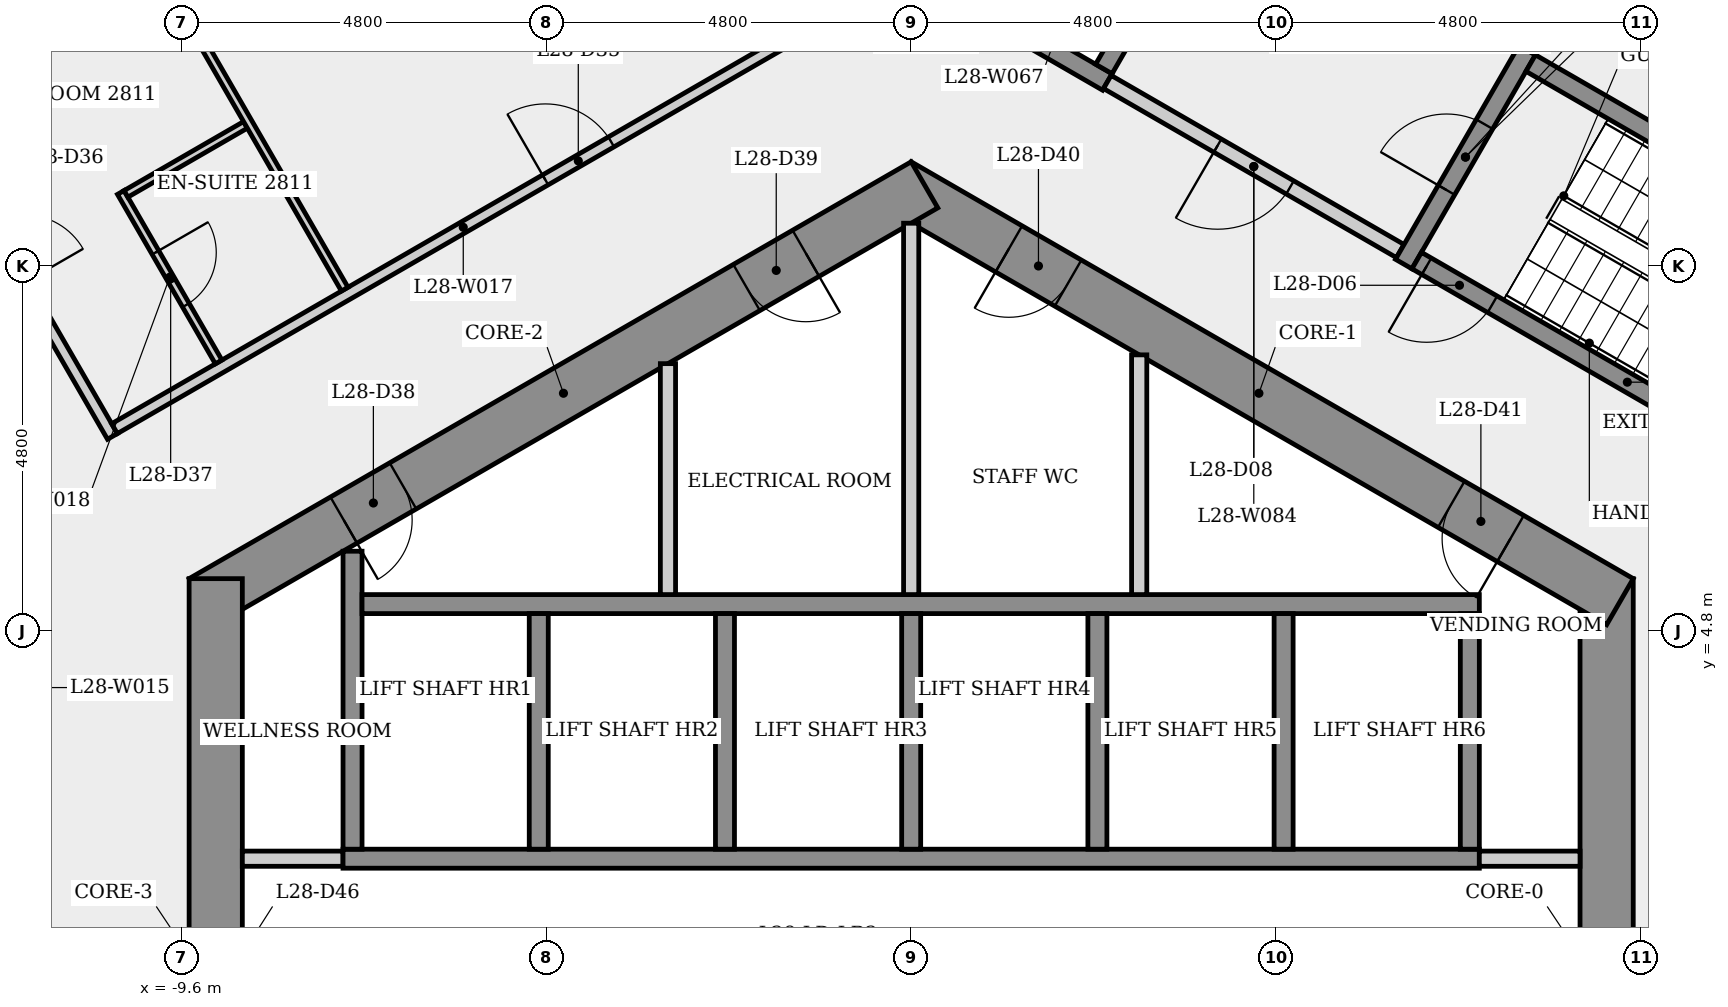
"""IFC4 building model, lengths in metres.
Left out: names, types, materials, properties, quantities, classifications, styles, units other than length and angle.
Written with IfcOpenShell. Run it as: python <this file> out.ifc"""

import sys

from ifc_helpers import new_model, si_unit, direction, frame, frame_2d, origin, place, context, subcontext, project, spatial, rectangle, extrude, element, fill, save


model = new_model("IFC4")
c1 = context("Model", 3, precision=1e-05, world=origin(), true_north=direction((0.0, 1.0)))
c2 = subcontext(c1, "Body", "Model", "MODEL_VIEW")
j1 = project(units=[si_unit("LENGTHUNIT", "METRE"), si_unit("PLANEANGLEUNIT", "RADIAN")], contexts=[c1])
p1 = place(None, origin())
s1 = spatial("IfcSite", under=j1, at=p1, CompositionType="ELEMENT")
p2 = place(p1, origin())
s2 = spatial("IfcBuilding", under=s1, at=p2, CompositionType="ELEMENT")
p3 = place(p2, frame((0.0, 0.0, 106.9)))
s3 = spatial("IfcBuildingStorey", under=s2, at=p3, CompositionType="ELEMENT", Elevation=106.9)
p4 = place(p3, frame((9.15, -5.485, 0.0), z_axis=(0.0, 0.0, 1.0), x_axis=(0.0, 1.0, 0.0)))
e1 = element("IfcWall", 1, at=p4, inside=s3, PredefinedType="SHEAR", context=c2, shape_type="SweptSolid", body=[
    extrude(rectangle(XDim=10.97, YDim=0.7, at=frame_2d((5.485, 0.0))), origin(), (0.0, 0.0, 1.0), 3.4),
])
p5 = place(p4, frame((4.685, 0.0, 0.0)))
e2 = element("IfcOpeningElement", 2, at=p5, cuts=e1, PredefinedType="OPENING", context=c2, shape_type="SweptSolid", body=[
    extrude(rectangle(XDim=1.6, YDim=2.1, at=frame_2d((0.8, 1.05))), frame((0.0, 0.36, 0.0), z_axis=(0.0, -1.0, 0.0), x_axis=(1.0, 0.0, 0.0)), (0.0, 0.0, 1.0), 0.72),
])
p6 = place(p3, frame((9.325, 5.182, 0.0), z_axis=(0.0, 0.0, 1.0), x_axis=(-0.866023993627, 0.500002442456, 0.0)))
e3 = element("IfcWall", 3, at=p6, inside=s3, PredefinedType="SHEAR", context=c2, shape_type="SweptSolid", body=[
    extrude(rectangle(XDim=10.97, YDim=0.7, at=frame_2d((5.485, 0.0))), origin(), (0.0, 0.0, 1.0), 3.4),
])
p7 = place(p6, frame((8.384, 0.0, 0.0)))
e4 = element("IfcOpeningElement", 4, at=p7, cuts=e3, PredefinedType="OPENING", context=c2, shape_type="SweptSolid", body=[
    extrude(rectangle(XDim=0.9, YDim=2.1, at=frame_2d((0.45, 1.05))), frame((0.0, 0.36, 0.0), z_axis=(0.0, -1.0, 0.0), x_axis=(1.0, 0.0, 0.0)), (0.0, 0.0, 1.0), 0.72),
])
p8 = place(p6, frame((1.663, 0.0, 0.0)))
e5 = element("IfcOpeningElement", 5, at=p8, cuts=e3, PredefinedType="OPENING", context=c2, shape_type="SweptSolid", body=[
    extrude(rectangle(XDim=0.9, YDim=2.1, at=frame_2d((0.45, 1.05))), frame((0.0, 0.36, 0.0), z_axis=(0.0, -1.0, 0.0), x_axis=(1.0, 0.0, 0.0)), (0.0, 0.0, 1.0), 0.72),
])
p9 = place(p3, frame((0.175, 10.667, 0.0), z_axis=(0.0, 0.0, 1.0), x_axis=(-0.866023993627, -0.500002442456, 0.0)))
e6 = element("IfcWall", 6, at=p9, inside=s3, PredefinedType="SHEAR", context=c2, shape_type="SweptSolid", body=[
    extrude(rectangle(XDim=10.97, YDim=0.7, at=frame_2d((5.485, 0.0))), origin(), (0.0, 0.0, 1.0), 3.4),
])
p10 = place(p9, frame((7.923, 0.0, 0.0)))
e7 = element("IfcOpeningElement", 7, at=p10, cuts=e6, PredefinedType="OPENING", context=c2, shape_type="SweptSolid", body=[
    extrude(rectangle(XDim=0.9, YDim=2.1, at=frame_2d((0.45, 1.05))), frame((0.0, 0.36, 0.0), z_axis=(0.0, -1.0, 0.0), x_axis=(1.0, 0.0, 0.0)), (0.0, 0.0, 1.0), 0.72),
])
p11 = place(p9, frame((1.802, 0.0, 0.0)))
e8 = element("IfcOpeningElement", 8, at=p11, cuts=e6, PredefinedType="OPENING", context=c2, shape_type="SweptSolid", body=[
    extrude(rectangle(XDim=0.9, YDim=2.1, at=frame_2d((0.45, 1.05))), frame((0.0, 0.36, 0.0), z_axis=(0.0, -1.0, 0.0), x_axis=(1.0, 0.0, 0.0)), (0.0, 0.0, 1.0), 0.72),
])
p12 = place(p3, frame((-9.15, 5.485, 0.0), z_axis=(0.0, 0.0, 1.0), x_axis=(0.0, -1.0, 0.0)))
e9 = element("IfcWall", 9, at=p12, inside=s3, PredefinedType="SHEAR", context=c2, shape_type="SweptSolid", body=[
    extrude(rectangle(XDim=10.97, YDim=0.7, at=frame_2d((5.485, 0.0))), origin(), (0.0, 0.0, 1.0), 3.4),
])
p13 = place(p12, frame((4.685, 0.0, 0.0)))
e10 = element("IfcOpeningElement", 10, at=p13, cuts=e9, PredefinedType="OPENING", context=c2, shape_type="SweptSolid", body=[
    extrude(rectangle(XDim=1.6, YDim=2.1, at=frame_2d((0.8, 1.05))), frame((0.0, 0.36, 0.0), z_axis=(0.0, -1.0, 0.0), x_axis=(1.0, 0.0, 0.0)), (0.0, 0.0, 1.0), 0.72),
])
p14 = place(p3, frame((-13.252, 12.108, 0.0), z_axis=(0.0, 0.0, 1.0), x_axis=(0.500015161905, -0.866016649877, 0.0)))
e11 = element("IfcWall", 11, at=p14, inside=s3, PredefinedType="PARTITIONING", context=c2, shape_type="SweptSolid", body=[
    extrude(rectangle(XDim=5.487, YDim=0.15, at=frame_2d((2.744, 0.0))), origin(), (0.0, 0.0, 1.0), 3.05),
])
p15 = place(p14, frame((2.256, 0.0, 0.0)))
e12 = element("IfcOpeningElement", 12, at=p15, cuts=e11, PredefinedType="OPENING", context=c2, shape_type="SweptSolid", body=[
    extrude(rectangle(XDim=0.9, YDim=2.1, at=frame_2d((0.45, 1.05))), frame((0.0, 0.085, 0.0), z_axis=(0.0, -1.0, 0.0), x_axis=(1.0, 0.0, 0.0)), (0.0, 0.0, 1.0), 0.17),
])
p16 = place(p3, frame((-10.481, 7.458, 0.0), z_axis=(0.0, 0.0, 1.0), x_axis=(0.866018292242, 0.500012317351, 0.0)))
e13 = element("IfcWall", 13, at=p16, inside=s3, PredefinedType="PARTITIONING", context=c2, shape_type="SweptSolid", body=[
    extrude(rectangle(XDim=10.596, YDim=0.15, at=frame_2d((5.298, 0.0))), origin(), (0.0, 0.0, 1.0), 3.05),
])
p17 = place(p16, frame((6.546, 0.0, 0.0)))
e14 = element("IfcOpeningElement", 14, at=p17, cuts=e13, PredefinedType="OPENING", context=c2, shape_type="SweptSolid", body=[
    extrude(rectangle(XDim=1.0, YDim=2.1, at=frame_2d((0.5, 1.05))), frame((0.0, 0.085, 0.0), z_axis=(0.0, -1.0, 0.0), x_axis=(1.0, 0.0, 0.0)), (0.0, 0.0, 1.0), 0.17),
])
p18 = place(p3, frame((-10.399, 10.566, 0.0), z_axis=(0.0, 0.0, 1.0), x_axis=(0.499963209246, -0.866046643894, 0.0)))
e15 = element("IfcWall", 15, at=p18, inside=s3, PredefinedType="PARTITIONING", context=c2, shape_type="SweptSolid", body=[
    extrude(rectangle(XDim=2.575, YDim=0.1, at=frame_2d((1.288, 0.0))), origin(), (0.0, 0.0, 1.0), 3.05),
])
p19 = place(p18, frame((0.913, 0.0, 0.0)))
e16 = element("IfcOpeningElement", 16, at=p19, cuts=e15, PredefinedType="OPENING", context=c2, shape_type="SweptSolid", body=[
    extrude(rectangle(XDim=0.8, YDim=2.1, at=frame_2d((0.4, 1.05))), frame((0.0, 0.06, 0.0), z_axis=(0.0, -1.0, 0.0), x_axis=(1.0, 0.0, 0.0)), (0.0, 0.0, 1.0), 0.12),
])
p20 = place(p3, frame((-8.8, 1.8, 0.0), z_axis=(0.0, 0.0, 1.0), x_axis=(1.0, 0.0, 0.0)))
e17 = element("IfcWall", 17, at=p20, inside=s3, PredefinedType="PARTITIONING", context=c2, shape_type="SweptSolid", body=[
    extrude(rectangle(XDim=1.325, YDim=0.2, at=frame_2d((0.663, 0.0))), origin(), (0.0, 0.0, 1.0), 3.05),
])
p21 = place(p3, frame((-8.759, 11.455, 0.0), z_axis=(0.0, 0.0, 1.0), x_axis=(-0.865999684151, -0.500044545065, 0.0)))
e18 = element("IfcWall", 18, at=p21, inside=s3, PredefinedType="PARTITIONING", context=c2, shape_type="SweptSolid", body=[
    extrude(rectangle(XDim=1.815, YDim=0.1, at=frame_2d((0.908, 0.0))), origin(), (0.0, 0.0, 1.0), 3.05),
])
p22 = place(p3, frame((-11.308, 15.971, 0.0), z_axis=(0.0, 0.0, 1.0), x_axis=(0.500021201058, -0.866013163002, 0.0)))
e19 = element("IfcWall", 19, at=p22, inside=s3, PredefinedType="PARTITIONING", context=c2, shape_type="SweptSolid", body=[
    extrude(rectangle(XDim=7.711, YDim=0.1, at=frame_2d((3.855, 0.0))), origin(), (0.0, 0.0, 1.0), 3.05),
])
p23 = place(p3, frame((-7.475, 1.8, 0.0), z_axis=(0.0, 0.0, 1.0), x_axis=(1.0, 0.0, 0.0)))
e20 = element("IfcWall", 20, at=p23, inside=s3, PredefinedType="SHEAR", context=c2, shape_type="SweptSolid", body=[
    extrude(rectangle(XDim=14.95, YDim=0.25, at=frame_2d((7.475, 0.0))), origin(), (0.0, 0.0, 1.0), 3.05),
])
p24 = place(p3, frame((-7.35, 1.925, 0.0), z_axis=(0.0, 0.0, 1.0), x_axis=(0.0, 1.0, 0.0)))
e21 = element("IfcWall", 21, at=p24, inside=s3, PredefinedType="SHEAR", context=c2, shape_type="SweptSolid", body=[
    extrude(rectangle(XDim=3.921, YDim=0.25, at=frame_2d((1.96, 0.0))), origin(), (0.0, 0.0, 1.0), 3.05),
])
p25 = place(p3, frame((-7.225, 5.15, 0.0), z_axis=(0.0, 0.0, 1.0), x_axis=(1.0, 0.0, 0.0)))
e22 = element("IfcWall", 22, at=p25, inside=s3, PredefinedType="SHEAR", context=c2, shape_type="SweptSolid", body=[
    extrude(rectangle(XDim=14.7, YDim=0.25, at=frame_2d((7.35, 0.0))), origin(), (0.0, 0.0, 1.0), 3.05),
])
p26 = place(p3, frame((-4.9, 5.025, 0.0), z_axis=(0.0, 0.0, 1.0), x_axis=(0.0, -1.0, 0.0)))
e23 = element("IfcWall", 23, at=p26, inside=s3, PredefinedType="SHEAR", context=c2, shape_type="SweptSolid", body=[
    extrude(rectangle(XDim=3.1, YDim=0.25, at=frame_2d((1.55, 0.0))), origin(), (0.0, 0.0, 1.0), 3.4),
])
p27 = place(p3, frame((-3.2, 8.314, 0.0), z_axis=(0.0, 0.0, 1.0), x_axis=(0.0, -1.0, 0.0)))
e24 = element("IfcWall", 24, at=p27, inside=s3, PredefinedType="PARTITIONING", context=c2, shape_type="SweptSolid", body=[
    extrude(rectangle(XDim=3.039, YDim=0.2, at=frame_2d((1.52, 0.0))), origin(), (0.0, 0.0, 1.0), 3.05),
])
for number, where, z_axis, x_axis in (
    (25, (-2.45, 5.025, 0.0), (0.0, 0.0, 1.0), (0.0, -1.0, 0.0)),
    (26, (0.0, 5.025, 0.0), (0.0, 0.0, 1.0), (0.0, -1.0, 0.0)),
):
    element("IfcWall", number, at=place(p3, frame(where, z_axis=z_axis, x_axis=x_axis)), inside=s3, PredefinedType="SHEAR", context=c2, shape_type="SweptSolid", body=[
        extrude(rectangle(XDim=3.1, YDim=0.25, at=frame_2d((1.55, 0.0))), origin(), (0.0, 0.0, 1.0), 3.4),
    ])
p28 = place(p3, frame((0.0, 10.161, 0.0), z_axis=(0.0, 0.0, 1.0), x_axis=(0.0, -1.0, 0.0)))
e27 = element("IfcWall", 27, at=p28, inside=s3, PredefinedType="PARTITIONING", context=c2, shape_type="SweptSolid", body=[
    extrude(rectangle(XDim=4.886, YDim=0.2, at=frame_2d((2.443, 0.0))), origin(), (0.0, 0.0, 1.0), 3.05),
])
p29 = place(p3, frame((2.45, 5.025, 0.0), z_axis=(0.0, 0.0, 1.0), x_axis=(0.0, -1.0, 0.0)))
e28 = element("IfcWall", 28, at=p29, inside=s3, PredefinedType="SHEAR", context=c2, shape_type="SweptSolid", body=[
    extrude(rectangle(XDim=3.1, YDim=0.25, at=frame_2d((1.55, 0.0))), origin(), (0.0, 0.0, 1.0), 3.4),
])
p30 = place(p3, frame((2.581, 12.02, 0.0), z_axis=(0.0, 0.0, 1.0), x_axis=(-0.86603892542, 0.499976579108, 0.0)))
e29 = element("IfcWall", 29, at=p30, inside=s3, PredefinedType="SHEAR", context=c2, shape_type="SweptSolid", body=[
    extrude(rectangle(XDim=2.162, YDim=0.25, at=frame_2d((1.081, 0.0))), origin(), (0.0, 0.0, 1.0), 3.05),
])
p31 = place(p3, frame((2.535, 12.191, 0.0), z_axis=(0.0, 0.0, 1.0), x_axis=(0.500061746146, 0.865989751695, 0.0)))
e30 = element("IfcWall", 30, at=p31, inside=s3, PredefinedType="SHEAR", context=c2, shape_type="SweptSolid", body=[
    extrude(rectangle(XDim=2.45, YDim=0.25, at=frame_2d((1.225, 0.0))), origin(), (0.0, 0.0, 1.0), 3.4),
])
p32 = place(p31, frame((0.675, 0.0, 0.0)))
e31 = element("IfcOpeningElement", 31, at=p32, cuts=e30, PredefinedType="OPENING", context=c2, shape_type="SweptSolid", body=[
    extrude(rectangle(XDim=1.1, YDim=2.1, at=frame_2d((0.55, 1.05))), frame((0.0, 0.135, 0.0), z_axis=(0.0, -1.0, 0.0), x_axis=(1.0, 0.0, 0.0)), (0.0, 0.0, 1.0), 0.27),
])
p33 = place(p3, frame((3.0, 8.429, 0.0), z_axis=(0.0, 0.0, 1.0), x_axis=(0.0, -1.0, 0.0)))
e32 = element("IfcWall", 32, at=p33, inside=s3, PredefinedType="PARTITIONING", context=c2, shape_type="SweptSolid", body=[
    extrude(rectangle(XDim=3.154, YDim=0.2, at=frame_2d((1.577, 0.0))), origin(), (0.0, 0.0, 1.0), 3.05),
])
p34 = place(p3, frame((4.9, 5.025, 0.0), z_axis=(0.0, 0.0, 1.0), x_axis=(0.0, -1.0, 0.0)))
e33 = element("IfcWall", 33, at=p34, inside=s3, PredefinedType="SHEAR", context=c2, shape_type="SweptSolid", body=[
    extrude(rectangle(XDim=3.1, YDim=0.25, at=frame_2d((1.55, 0.0))), origin(), (0.0, 0.0, 1.0), 3.4),
])
p35 = place(p3, frame((6.435, 9.795, 0.0), z_axis=(0.0, 0.0, 1.0), x_axis=(-0.866012907634, 0.500021643343, 0.0)))
e34 = element("IfcWall", 34, at=p35, inside=s3, PredefinedType="PARTITIONING", context=c2, shape_type="SweptSolid", body=[
    extrude(rectangle(XDim=4.45, YDim=0.2, at=frame_2d((2.225, 0.0))), origin(), (0.0, 0.0, 1.0), 3.05),
])
p36 = place(p35, frame((1.675, 0.0, 0.0)))
e35 = element("IfcOpeningElement", 35, at=p36, cuts=e34, PredefinedType="OPENING", context=c2, shape_type="SweptSolid", body=[
    extrude(rectangle(XDim=1.1, YDim=2.1, at=frame_2d((0.55, 1.05))), frame((0.0, 0.11, 0.0), z_axis=(0.0, -1.0, 0.0), x_axis=(1.0, 0.0, 0.0)), (0.0, 0.0, 1.0), 0.22),
])
p37 = place(p3, frame((6.48, 9.624, 0.0), z_axis=(0.0, 0.0, 1.0), x_axis=(0.500017246033, 0.866015446554, 0.0)))
e36 = element("IfcWall", 36, at=p37, inside=s3, PredefinedType="SHEAR", context=c2, shape_type="SweptSolid", body=[
    extrude(rectangle(XDim=3.25, YDim=0.25, at=frame_2d((1.625, 0.0))), origin(), (0.0, 0.0, 1.0), 3.05),
])
p38 = place(p37, frame((1.125, 0.0, 0.0)))
e37 = element("IfcOpeningElement", 37, at=p38, cuts=e36, PredefinedType="OPENING", context=c2, shape_type="SweptSolid", body=[
    extrude(rectangle(XDim=1.0, YDim=2.1, at=frame_2d((0.5, 1.05))), frame((0.0, 0.135, 0.0), z_axis=(0.0, -1.0, 0.0), x_axis=(1.0, 0.0, 0.0)), (0.0, 0.0, 1.0), 0.27),
])
p39 = place(p3, frame((7.475, 1.8, 0.0), z_axis=(0.0, 0.0, 1.0), x_axis=(1.0, 0.0, 0.0)))
e38 = element("IfcWall", 38, at=p39, inside=s3, PredefinedType="PARTITIONING", context=c2, shape_type="SweptSolid", body=[
    extrude(rectangle(XDim=1.325, YDim=0.2, at=frame_2d((0.663, 0.0))), origin(), (0.0, 0.0, 1.0), 3.05),
])
p40 = place(p3, frame((7.35, 5.025, 0.0), z_axis=(0.0, 0.0, 1.0), x_axis=(0.0, -1.0, 0.0)))
e39 = element("IfcWall", 39, at=p40, inside=s3, PredefinedType="SHEAR", context=c2, shape_type="SweptSolid", body=[
    extrude(rectangle(XDim=3.1, YDim=0.25, at=frame_2d((1.55, 0.0))), origin(), (0.0, 0.0, 1.0), 3.4),
])
p41 = place(p3, frame((8.151, 12.268, 0.0), z_axis=(0.0, 0.0, 1.0), x_axis=(0.866025499775, -0.499999833739, 0.0)))
e40 = element("IfcWall", 40, at=p41, inside=s3, PredefinedType="SHEAR", context=c2, shape_type="SweptSolid", body=[
    extrude(rectangle(XDim=6.4, YDim=0.25, at=frame_2d((3.2, 0.0))), origin(), (0.0, 0.0, 1.0), 3.05),
])
p42 = place(p3, frame((8.393, 12.937, 0.0), z_axis=(0.0, 0.0, 1.0), x_axis=(-0.500065409566, -0.86598763626, 0.0)))
e41 = element("IfcWall", 41, at=p42, inside=s3, PredefinedType="PARTITIONING", context=c2, shape_type="SweptSolid", body=[
    extrude(rectangle(XDim=0.575, YDim=0.2, at=frame_2d((0.288, 0.0))), origin(), (0.0, 0.0, 1.0), 3.05),
])
p43 = place(p3, frame((12.194, 6.47, 0.0), z_axis=(0.0, 0.0, 1.0), x_axis=(-0.866025499775, 0.499999833739, 0.0)))
e42 = element("IfcWall", 42, at=p43, inside=s3, PredefinedType="SHEAR", context=c2, shape_type="SweptSolid", body=[
    extrude(rectangle(XDim=6.4, YDim=0.25, at=frame_2d((3.2, 0.0))), origin(), (0.0, 0.0, 1.0), 3.05),
])
p44 = place(p43, frame((5.25, 0.0, 0.0)))
e43 = element("IfcOpeningElement", 43, at=p44, cuts=e42, PredefinedType="OPENING", context=c2, shape_type="SweptSolid", body=[
    extrude(rectangle(XDim=1.0, YDim=2.1, at=frame_2d((0.5, 1.05))), frame((0.0, 0.135, 0.0), z_axis=(0.0, -1.0, 0.0), x_axis=(1.0, 0.0, 0.0)), (0.0, 0.0, 1.0), 0.27),
])
p45 = place(p44, origin())
e44 = element("IfcDoor", 44, at=p45, inside=s3, OperationType="SINGLE_SWING_RIGHT", PredefinedType="DOOR", context=c2, shape_type="SweptSolid", body=[
    extrude(rectangle(XDim=1.0, YDim=2.1, at=frame_2d((0.5, 1.05))), frame((0.0, 0.025, 0.0), z_axis=(0.0, -1.0, 0.0), x_axis=(1.0, 0.0, 0.0)), (0.0, 0.0, 1.0), 0.05),
])
fill(e43, e44)
p46 = place(p38, origin())
e45 = element("IfcDoor", 45, at=p46, inside=s3, OperationType="SINGLE_SWING_LEFT", PredefinedType="DOOR", context=c2, shape_type="SweptSolid", body=[
    extrude(rectangle(XDim=1.0, YDim=2.1, at=frame_2d((0.5, 1.05))), frame((0.0, 0.025, 0.0), z_axis=(0.0, -1.0, 0.0), x_axis=(1.0, 0.0, 0.0)), (0.0, 0.0, 1.0), 0.05),
])
fill(e37, e45)
p47 = place(p36, origin())
e46 = element("IfcDoor", 46, at=p47, inside=s3, OperationType="SINGLE_SWING_RIGHT", PredefinedType="DOOR", context=c2, shape_type="SweptSolid", body=[
    extrude(rectangle(XDim=1.1, YDim=2.1, at=frame_2d((0.55, 1.05))), frame((0.0, 0.025, 0.0), z_axis=(0.0, -1.0, 0.0), x_axis=(1.0, 0.0, 0.0)), (0.0, 0.0, 1.0), 0.05),
])
fill(e35, e46)
p48 = place(p17, origin())
e47 = element("IfcDoor", 47, at=p48, inside=s3, OperationType="SINGLE_SWING_LEFT", PredefinedType="DOOR", context=c2, shape_type="SweptSolid", body=[
    extrude(rectangle(XDim=1.0, YDim=2.1, at=frame_2d((0.5, 1.05))), frame((0.0, 0.025, 0.0), z_axis=(0.0, -1.0, 0.0), x_axis=(1.0, 0.0, 0.0)), (0.0, 0.0, 1.0), 0.05),
])
fill(e14, e47)
p49 = place(p19, origin())
e48 = element("IfcDoor", 48, at=p49, inside=s3, OperationType="SINGLE_SWING_LEFT", PredefinedType="DOOR", context=c2, shape_type="SweptSolid", body=[
    extrude(rectangle(XDim=0.8, YDim=2.1, at=frame_2d((0.4, 1.05))), frame((0.0, 0.025, 0.0), z_axis=(0.0, -1.0, 0.0), x_axis=(1.0, 0.0, 0.0)), (0.0, 0.0, 1.0), 0.05),
])
fill(e16, e48)
p50 = place(p10, origin())
e49 = element("IfcDoor", 49, at=p50, inside=s3, OperationType="SINGLE_SWING_RIGHT", PredefinedType="DOOR", context=c2, shape_type="SweptSolid", body=[
    extrude(rectangle(XDim=0.9, YDim=2.1, at=frame_2d((0.45, 1.05))), frame((0.0, 0.025, 0.0), z_axis=(0.0, -1.0, 0.0), x_axis=(1.0, 0.0, 0.0)), (0.0, 0.0, 1.0), 0.05),
])
fill(e7, e49)
p51 = place(p11, origin())
e50 = element("IfcDoor", 50, at=p51, inside=s3, OperationType="SINGLE_SWING_LEFT", PredefinedType="DOOR", context=c2, shape_type="SweptSolid", body=[
    extrude(rectangle(XDim=0.9, YDim=2.1, at=frame_2d((0.45, 1.05))), frame((0.0, 0.025, 0.0), z_axis=(0.0, -1.0, 0.0), x_axis=(1.0, 0.0, 0.0)), (0.0, 0.0, 1.0), 0.05),
])
fill(e8, e50)
p52 = place(p7, origin())
e51 = element("IfcDoor", 51, at=p52, inside=s3, OperationType="SINGLE_SWING_RIGHT", PredefinedType="DOOR", context=c2, shape_type="SweptSolid", body=[
    extrude(rectangle(XDim=0.9, YDim=2.1, at=frame_2d((0.45, 1.05))), frame((0.0, 0.025, 0.0), z_axis=(0.0, -1.0, 0.0), x_axis=(1.0, 0.0, 0.0)), (0.0, 0.0, 1.0), 0.05),
])
fill(e4, e51)
p53 = place(p8, origin())
e52 = element("IfcDoor", 52, at=p53, inside=s3, OperationType="SINGLE_SWING_LEFT", PredefinedType="DOOR", context=c2, shape_type="SweptSolid", body=[
    extrude(rectangle(XDim=0.9, YDim=2.1, at=frame_2d((0.45, 1.05))), frame((0.0, 0.025, 0.0), z_axis=(0.0, -1.0, 0.0), x_axis=(1.0, 0.0, 0.0)), (0.0, 0.0, 1.0), 0.05),
])
fill(e5, e52)
save(model, sys.argv[1])
